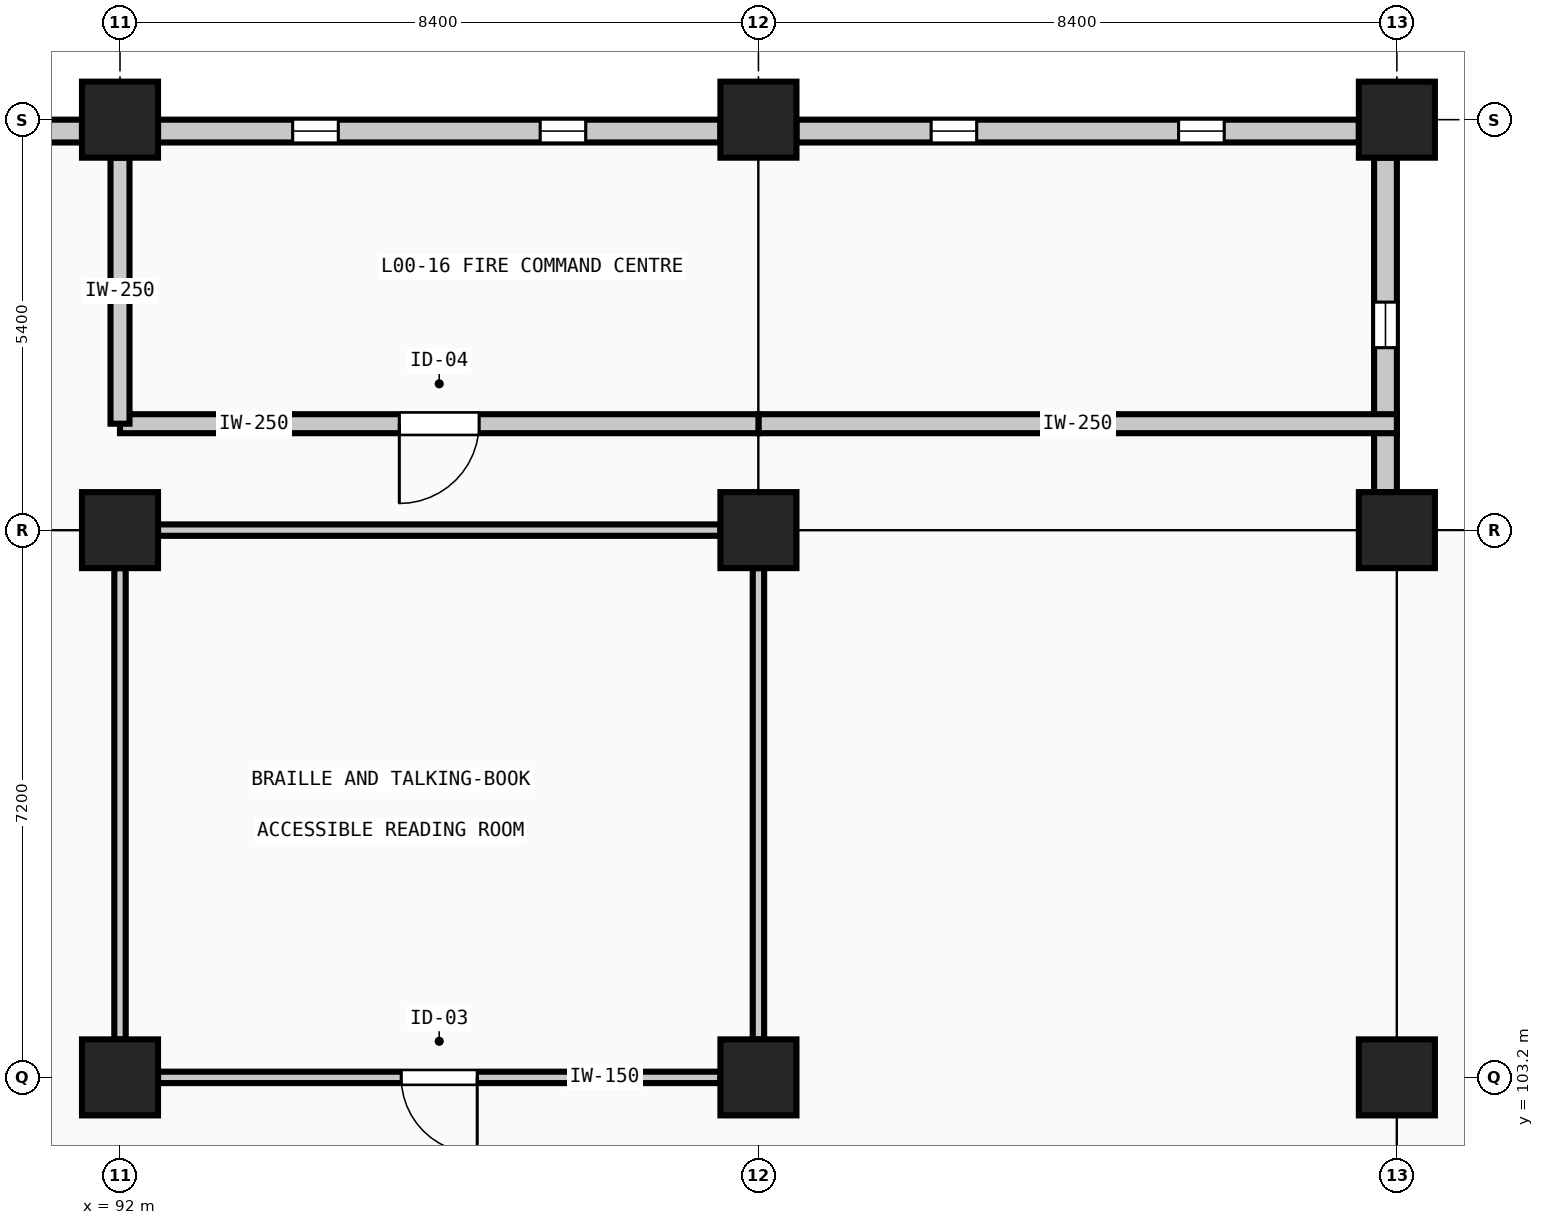
"""IFC4 building model, lengths in metres.
Left out: names, types, materials, properties, quantities, classifications, styles, units other than length and angle.
Written with IfcOpenShell. Run it as: python <this file> out.ifc"""

import sys

from ifc_helpers import new_model, si_unit, direction, frame, frame_2d, origin, origin_2d, place, context, subcontext, project, spatial, rectangle, extrude, element, fill, save


model = new_model("IFC4")
c1 = context("Model", 3, precision=1e-05, world=origin(), true_north=direction((0.0, 1.0)))
c2 = subcontext(c1, "Body", "Model", "MODEL_VIEW")
j1 = project(units=[si_unit("LENGTHUNIT", "METRE"), si_unit("PLANEANGLEUNIT", "RADIAN")], contexts=[c1])
p1 = place(None, origin())
s1 = spatial("IfcSite", under=j1, at=p1, CompositionType="ELEMENT")
p2 = place(p1, origin())
s2 = spatial("IfcBuilding", under=s1, at=p2, CompositionType="ELEMENT")
p3 = place(p2, origin())
s3 = spatial("IfcBuildingStorey", under=s2, at=p3, CompositionType="ELEMENT", Elevation=0.0)
for number, where, z_axis, x_axis in (
    (1, (92.0, 103.2, 0.0), (0.0, 0.0, 1.0), (1.0, 0.0, 0.0)),
    (2, (92.0, 110.4, 0.0), (0.0, 0.0, 1.0), (1.0, 0.0, 0.0)),
    (3, (92.0, 115.8, 0.0), (0.0, 0.0, 1.0), (1.0, 0.0, 0.0)),
    (4, (100.4, 103.2, 0.0), (0.0, 0.0, 1.0), (1.0, 0.0, 0.0)),
    (5, (100.4, 110.4, 0.0), (0.0, 0.0, 1.0), (1.0, 0.0, 0.0)),
    (6, (100.4, 115.8, 0.0), (0.0, 0.0, 1.0), (1.0, 0.0, 0.0)),
    (7, (108.8, 103.2, 0.0), (0.0, 0.0, 1.0), (1.0, 0.0, 0.0)),
    (8, (108.8, 110.4, 0.0), (0.0, 0.0, 1.0), (1.0, 0.0, 0.0)),
    (9, (108.8, 115.8, 0.0), (0.0, 0.0, 1.0), (1.0, 0.0, 0.0)),
):
    element("IfcColumn", number, at=place(p3, frame(where, z_axis=z_axis, x_axis=x_axis)), inside=s3, PredefinedType="COLUMN", context=c2, shape_type="SweptSolid", body=[
        extrude(rectangle(XDim=1.0, YDim=1.0, at=origin_2d()), origin(), (0.0, 0.0, 1.0), 4.8),
    ])
p4 = place(p3, frame((84.1, 115.65, 0.0), z_axis=(0.0, 0.0, 1.0), x_axis=(1.0, 0.0, 0.0)))
e10 = element("IfcWall", 10, at=p4, inside=s3, PredefinedType="SOLIDWALL", context=c2, shape_type="SweptSolid", body=[
    extrude(rectangle(XDim=7.4, YDim=0.3, at=frame_2d((3.7, 0.0))), origin(), (0.0, 0.0, 1.0), 3.85),
])
p5 = place(p4, frame((2.7, 0.0, 0.0)))
e11 = element("IfcOpeningElement", 11, at=p5, cuts=e10, PredefinedType="OPENING", context=c2, shape_type="SweptSolid", body=[
    extrude(rectangle(XDim=2.0, YDim=2.4, at=frame_2d((1.0, 1.2))), frame((0.0, 0.16, 0.0), z_axis=(0.0, -1.0, 0.0), x_axis=(1.0, 0.0, 0.0)), (0.0, 0.0, 1.0), 0.32),
])
p6 = place(p3, frame((92.5, 115.65, 0.0), z_axis=(0.0, 0.0, 1.0), x_axis=(1.0, 0.0, 0.0)))
e12 = element("IfcWall", 12, at=p6, inside=s3, PredefinedType="SOLIDWALL", context=c2, shape_type="SweptSolid", body=[
    extrude(rectangle(XDim=7.4, YDim=0.3, at=frame_2d((3.7, 0.0))), origin(), (0.0, 0.0, 1.0), 3.85),
])
p7 = place(p6, frame((1.772, 0.0, 0.9)))
e13 = element("IfcOpeningElement", 13, at=p7, cuts=e12, PredefinedType="OPENING", context=c2, shape_type="SweptSolid", body=[
    extrude(rectangle(XDim=0.6, YDim=2.4, at=frame_2d((0.3, 1.2))), frame((0.0, 0.16, 0.0), z_axis=(0.0, -1.0, 0.0), x_axis=(1.0, 0.0, 0.0)), (0.0, 0.0, 1.0), 0.32),
])
p8 = place(p6, frame((5.028, 0.0, 0.9)))
e14 = element("IfcOpeningElement", 14, at=p8, cuts=e12, PredefinedType="OPENING", context=c2, shape_type="SweptSolid", body=[
    extrude(rectangle(XDim=0.6, YDim=2.4, at=frame_2d((0.3, 1.2))), frame((0.0, 0.16, 0.0), z_axis=(0.0, -1.0, 0.0), x_axis=(1.0, 0.0, 0.0)), (0.0, 0.0, 1.0), 0.32),
])
p9 = place(p3, frame((100.9, 115.65, 0.0), z_axis=(0.0, 0.0, 1.0), x_axis=(1.0, 0.0, 0.0)))
e15 = element("IfcWall", 15, at=p9, inside=s3, PredefinedType="SOLIDWALL", context=c2, shape_type="SweptSolid", body=[
    extrude(rectangle(XDim=7.4, YDim=0.3, at=frame_2d((3.7, 0.0))), origin(), (0.0, 0.0, 1.0), 3.85),
])
p10 = place(p9, frame((1.772, 0.0, 0.9)))
e16 = element("IfcOpeningElement", 16, at=p10, cuts=e15, PredefinedType="OPENING", context=c2, shape_type="SweptSolid", body=[
    extrude(rectangle(XDim=0.6, YDim=2.4, at=frame_2d((0.3, 1.2))), frame((0.0, 0.16, 0.0), z_axis=(0.0, -1.0, 0.0), x_axis=(1.0, 0.0, 0.0)), (0.0, 0.0, 1.0), 0.32),
])
p11 = place(p9, frame((5.028, 0.0, 0.9)))
e17 = element("IfcOpeningElement", 17, at=p11, cuts=e15, PredefinedType="OPENING", context=c2, shape_type="SweptSolid", body=[
    extrude(rectangle(XDim=0.6, YDim=2.4, at=frame_2d((0.3, 1.2))), frame((0.0, 0.16, 0.0), z_axis=(0.0, -1.0, 0.0), x_axis=(1.0, 0.0, 0.0)), (0.0, 0.0, 1.0), 0.32),
])
p12 = place(p3, frame((108.65, 115.3, 0.0), z_axis=(0.0, 0.0, 1.0), x_axis=(0.0, -1.0, 0.0)))
e18 = element("IfcWall", 18, at=p12, inside=s3, PredefinedType="SOLIDWALL", context=c2, shape_type="SweptSolid", body=[
    extrude(rectangle(XDim=4.4, YDim=0.3, at=frame_2d((2.2, 0.0))), origin(), (0.0, 0.0, 1.0), 4.2),
])
p13 = place(p12, frame((1.9, 0.0, 0.9)))
e19 = element("IfcOpeningElement", 19, at=p13, cuts=e18, PredefinedType="OPENING", context=c2, shape_type="SweptSolid", body=[
    extrude(rectangle(XDim=0.6, YDim=2.4, at=frame_2d((0.3, 1.2))), frame((0.0, 0.16, 0.0), z_axis=(0.0, -1.0, 0.0), x_axis=(1.0, 0.0, 0.0)), (0.0, 0.0, 1.0), 0.32),
])
p14 = place(p3, frame((108.8, 111.8, 0.0), z_axis=(0.0, 0.0, 1.0), x_axis=(-1.0, 0.0, 0.0)))
e20 = element("IfcWall", 20, at=p14, inside=s3, PredefinedType="SOLIDWALL", context=c2, shape_type="SweptSolid", body=[
    extrude(rectangle(XDim=8.4, YDim=0.25, at=frame_2d((4.2, 0.0))), origin(), (0.0, 0.0, 1.0), 4.525),
])
p15 = place(p3, frame((100.4, 111.8, 0.0), z_axis=(0.0, 0.0, 1.0), x_axis=(-1.0, 0.0, 0.0)))
e21 = element("IfcWall", 21, at=p15, inside=s3, PredefinedType="SOLIDWALL", context=c2, shape_type="SweptSolid", body=[
    extrude(rectangle(XDim=8.4, YDim=0.25, at=frame_2d((4.2, 0.0))), origin(), (0.0, 0.0, 1.0), 4.525),
])
p16 = place(p15, frame((3.675, 0.0, 0.0)))
e22 = element("IfcOpeningElement", 22, at=p16, cuts=e21, PredefinedType="OPENING", context=c2, shape_type="SweptSolid", body=[
    extrude(rectangle(XDim=1.05, YDim=2.2, at=frame_2d((0.525, 1.1))), frame((0.0, 0.135, 0.0), z_axis=(0.0, -1.0, 0.0), x_axis=(1.0, 0.0, 0.0)), (0.0, 0.0, 1.0), 0.27),
])
p17 = place(p3, frame((99.9, 103.2, 0.0), z_axis=(0.0, 0.0, 1.0), x_axis=(-1.0, 0.0, 0.0)))
e23 = element("IfcWall", 23, at=p17, inside=s3, PredefinedType="PARTITIONING", context=c2, shape_type="SweptSolid", body=[
    extrude(rectangle(XDim=7.4, YDim=0.15, at=frame_2d((3.7, 0.0))), origin(), (0.0, 0.0, 1.0), 3.85),
])
p18 = place(p17, frame((3.2, 0.0, 0.0)))
e24 = element("IfcOpeningElement", 24, at=p18, cuts=e23, PredefinedType="OPENING", context=c2, shape_type="SweptSolid", body=[
    extrude(rectangle(XDim=1.0, YDim=2.15, at=frame_2d((0.5, 1.075))), frame((0.0, 0.085, 0.0), z_axis=(0.0, -1.0, 0.0), x_axis=(1.0, 0.0, 0.0)), (0.0, 0.0, 1.0), 0.17),
])
p19 = place(p3, frame((92.0, 111.8, 0.0), z_axis=(0.0, 0.0, 1.0), x_axis=(0.0, 1.0, 0.0)))
e25 = element("IfcWall", 25, at=p19, inside=s3, PredefinedType="SOLIDWALL", context=c2, shape_type="SweptSolid", body=[
    extrude(rectangle(XDim=3.5, YDim=0.25, at=frame_2d((1.75, 0.0))), origin(), (0.0, 0.0, 1.0), 3.85),
])
p20 = place(p3, frame((92.5, 110.4, 0.0), z_axis=(0.0, 0.0, 1.0), x_axis=(1.0, 0.0, 0.0)))
e26 = element("IfcWall", 26, at=p20, inside=s3, PredefinedType="PARTITIONING", context=c2, shape_type="SweptSolid", body=[
    extrude(rectangle(XDim=7.4, YDim=0.15, at=frame_2d((3.7, 0.0))), origin(), (0.0, 0.0, 1.0), 3.85),
])
for number, where, z_axis, x_axis in (
    (27, (92.0, 103.7, 0.0), (0.0, 0.0, 1.0), (0.0, 1.0, 0.0)),
    (28, (100.4, 109.9, 0.0), (0.0, 0.0, 1.0), (0.0, -1.0, 0.0)),
):
    element("IfcWall", number, at=place(p3, frame(where, z_axis=z_axis, x_axis=x_axis)), inside=s3, PredefinedType="PARTITIONING", context=c2, shape_type="SweptSolid", body=[
        extrude(rectangle(XDim=6.2, YDim=0.15, at=frame_2d((3.1, 0.0))), origin(), (0.0, 0.0, 1.0), 3.85),
    ])
p21 = place(p7, origin())
e29 = element("IfcWindow", 29, at=p21, inside=s3, PartitioningType="SINGLE_PANEL", PredefinedType="WINDOW", context=c2, shape_type="SweptSolid", body=[
    extrude(rectangle(XDim=0.6, YDim=2.4, at=frame_2d((0.3, 1.2))), frame((0.0, 0.03, 0.0), z_axis=(0.0, -1.0, 0.0), x_axis=(1.0, 0.0, 0.0)), (0.0, 0.0, 1.0), 0.06),
])
fill(e13, e29)
p22 = place(p8, origin())
e30 = element("IfcWindow", 30, at=p22, inside=s3, PartitioningType="SINGLE_PANEL", PredefinedType="WINDOW", context=c2, shape_type="SweptSolid", body=[
    extrude(rectangle(XDim=0.6, YDim=2.4, at=frame_2d((0.3, 1.2))), frame((0.0, 0.03, 0.0), z_axis=(0.0, -1.0, 0.0), x_axis=(1.0, 0.0, 0.0)), (0.0, 0.0, 1.0), 0.06),
])
fill(e14, e30)
p23 = place(p10, origin())
e31 = element("IfcWindow", 31, at=p23, inside=s3, PartitioningType="SINGLE_PANEL", PredefinedType="WINDOW", context=c2, shape_type="SweptSolid", body=[
    extrude(rectangle(XDim=0.6, YDim=2.4, at=frame_2d((0.3, 1.2))), frame((0.0, 0.03, 0.0), z_axis=(0.0, -1.0, 0.0), x_axis=(1.0, 0.0, 0.0)), (0.0, 0.0, 1.0), 0.06),
])
fill(e16, e31)
p24 = place(p11, origin())
e32 = element("IfcWindow", 32, at=p24, inside=s3, PartitioningType="SINGLE_PANEL", PredefinedType="WINDOW", context=c2, shape_type="SweptSolid", body=[
    extrude(rectangle(XDim=0.6, YDim=2.4, at=frame_2d((0.3, 1.2))), frame((0.0, 0.03, 0.0), z_axis=(0.0, -1.0, 0.0), x_axis=(1.0, 0.0, 0.0)), (0.0, 0.0, 1.0), 0.06),
])
fill(e17, e32)
p25 = place(p13, origin())
e33 = element("IfcWindow", 33, at=p25, inside=s3, PartitioningType="SINGLE_PANEL", PredefinedType="WINDOW", context=c2, shape_type="SweptSolid", body=[
    extrude(rectangle(XDim=0.6, YDim=2.4, at=frame_2d((0.3, 1.2))), frame((0.0, 0.03, 0.0), z_axis=(0.0, -1.0, 0.0), x_axis=(1.0, 0.0, 0.0)), (0.0, 0.0, 1.0), 0.06),
])
fill(e19, e33)
p26 = place(p16, origin())
e34 = element("IfcDoor", 34, at=p26, inside=s3, OperationType="SINGLE_SWING_RIGHT", PredefinedType="DOOR", context=c2, shape_type="SweptSolid", body=[
    extrude(rectangle(XDim=1.05, YDim=2.2, at=frame_2d((0.525, 1.1))), frame((0.0, 0.025, 0.0), z_axis=(0.0, -1.0, 0.0), x_axis=(1.0, 0.0, 0.0)), (0.0, 0.0, 1.0), 0.05),
])
fill(e22, e34)
p27 = place(p18, origin())
e35 = element("IfcDoor", 35, at=p27, inside=s3, OperationType="SINGLE_SWING_LEFT", PredefinedType="DOOR", context=c2, shape_type="SweptSolid", body=[
    extrude(rectangle(XDim=1.0, YDim=2.15, at=frame_2d((0.5, 1.075))), frame((0.0, 0.025, 0.0), z_axis=(0.0, -1.0, 0.0), x_axis=(1.0, 0.0, 0.0)), (0.0, 0.0, 1.0), 0.05),
])
fill(e24, e35)
save(model, sys.argv[1])
